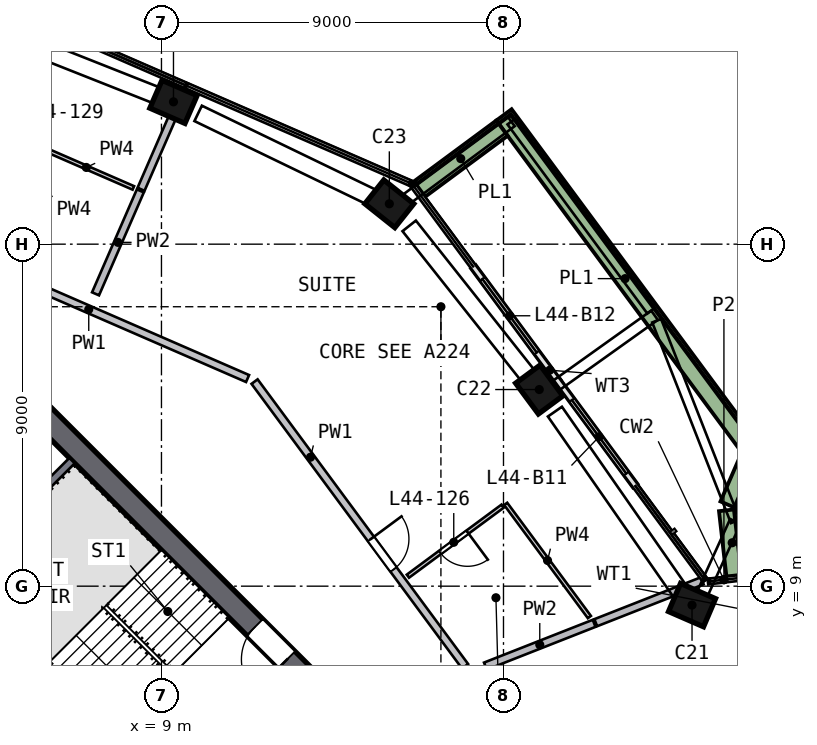
"""IFC4 building model, lengths in metres.
Left out: names, types, materials, properties, quantities, classifications, styles, units other than length and angle.
Written with IfcOpenShell. Run it as: python <this file> out.ifc"""

import sys

from ifc_helpers import new_model, si_unit, direction, frame, frame_2d, origin, origin_2d, place, context, subcontext, project, spatial, rectangle, extrude, element, fill, save


model = new_model("IFC4")
c1 = context("Model", 3, precision=1e-05, world=origin(), true_north=direction((0.0, 1.0)))
c2 = subcontext(c1, "Body", "Model", "MODEL_VIEW")
j1 = project(units=[si_unit("LENGTHUNIT", "METRE"), si_unit("PLANEANGLEUNIT", "RADIAN")], contexts=[c1])
p1 = place(None, origin())
s1 = spatial("IfcSite", under=j1, at=p1, CompositionType="ELEMENT")
p2 = place(p1, origin())
s2 = spatial("IfcBuilding", under=s1, at=p2, CompositionType="ELEMENT")
p3 = place(p2, frame((0.0, 0.0, 183.5)))
s3 = spatial("IfcBuildingStorey", under=s2, at=p3, CompositionType="ELEMENT", Elevation=183.5)
p4 = place(p3, frame((23.01, 8.37, 0.0), z_axis=(-0.040743451, 0.109079948, 0.993197632), x_axis=(0.916711582, -0.391338569, 0.080585355)))
e1 = element("IfcColumn", 1, at=p4, inside=s3, PredefinedType="COLUMN", context=c2, shape_type="SweptSolid", body=[
    extrude(rectangle(XDim=1.0, YDim=0.8, at=origin_2d()), origin(), (0.0, 0.0, 1.0), 3.212),
])
p5 = place(p3, frame((19.023, 14.066, 0.0), z_axis=(-0.067607436, 0.089889752, 0.9936544), x_axis=(-0.590507389, 0.799156424, -0.112472368)))
e2 = element("IfcColumn", 2, at=p5, inside=s3, PredefinedType="COLUMN", context=c2, shape_type="SweptSolid", body=[
    extrude(rectangle(XDim=1.0, YDim=0.8, at=origin_2d()), origin(), (0.0, 0.0, 1.0), 3.21),
])
p6 = place(p3, frame((15.106, 18.977, 0.0), z_axis=(-0.090848232, 0.07108209, 0.993324688), x_axis=(0.777092625, -0.618726057, 0.115347815)))
e3 = element("IfcColumn", 3, at=p6, inside=s3, PredefinedType="COLUMN", context=c2, shape_type="SweptSolid", body=[
    extrude(rectangle(XDim=1.0, YDim=0.8, at=origin_2d()), origin(), (0.0, 0.0, 1.0), 3.211),
])
p7 = place(p3, frame((9.441, 21.693, 0.0), z_axis=(-0.103577696, 0.044031928, 0.99364624), x_axis=(-0.911115934, 0.39648645, -0.112544433)))
e4 = element("IfcColumn", 4, at=p7, inside=s3, PredefinedType="COLUMN", context=c2, shape_type="SweptSolid", body=[
    extrude(rectangle(XDim=1.0, YDim=0.8, at=origin_2d()), origin(), (0.0, 0.0, 1.0), 3.21),
])
p8 = place(p3, frame((13.788, 5.587, 0.0), z_axis=(0.0, 0.0, 1.0), x_axis=(-0.707106781, 0.707106781, 0.0)))
e5 = element("IfcWall", 5, at=p8, inside=s3, PredefinedType="SHEAR", context=c2, shape_type="SweptSolid", body=[
    extrude(rectangle(XDim=11.598, YDim=0.6, at=frame_2d((5.799, 0.0))), origin(), (0.0, 0.0, 1.0), 3.5),
])
p9 = place(p8, frame((2.099, 0.0, 0.0)))
e6 = element("IfcOpeningElement", 6, at=p9, cuts=e5, PredefinedType="OPENING", context=c2, shape_type="SweptSolid", body=[
    extrude(rectangle(XDim=1.2, YDim=2.1, at=frame_2d((0.6, 1.05))), frame((0.0, 0.31, 0.0), z_axis=(0.0, -1.0, 0.0), x_axis=(1.0, 0.0, 0.0)), (0.0, 0.0, 1.0), 0.62),
])
p10 = place(p3, frame((21.466, 11.644, 0.0), z_axis=(0.0, 0.0, 1.0), x_axis=(-0.594528355, 0.804074645, 0.0)))
e7 = element("IfcWall", 7, at=p10, inside=s3, PredefinedType="SOLIDWALL", context=c2, shape_type="SweptSolid", body=[
    extrude(rectangle(XDim=3.4, YDim=0.15, at=frame_2d((1.7, 0.0))), origin(), (0.0, 0.0, 1.0), 2.475),
])
p11 = place(p10, frame((0.4, 0.0, 0.0)))
e8 = element("IfcOpeningElement", 8, at=p11, cuts=e7, PredefinedType="OPENING", context=c2, shape_type="SweptSolid", body=[
    extrude(rectangle(XDim=2.4, YDim=2.4, at=frame_2d((1.2, 1.2))), frame((0.0, 0.085, 0.0), z_axis=(0.0, -1.0, 0.0), x_axis=(1.0, 0.0, 0.0)), (0.0, 0.0, 1.0), 0.17),
])
p12 = place(p3, frame((19.445, 14.378, 0.0), z_axis=(0.0, 0.0, 1.0), x_axis=(-0.59454435, 0.804062818, 0.0)))
e9 = element("IfcWall", 9, at=p12, inside=s3, PredefinedType="SOLIDWALL", context=c2, shape_type="SweptSolid", body=[
    extrude(rectangle(XDim=3.761, YDim=0.15, at=frame_2d((1.881, 0.0))), origin(), (0.0, 0.0, 1.0), 2.475),
])
p13 = place(p12, frame((0.961, 0.0, 0.0)))
e10 = element("IfcOpeningElement", 10, at=p13, cuts=e9, PredefinedType="OPENING", context=c2, shape_type="SweptSolid", body=[
    extrude(rectangle(XDim=2.4, YDim=2.4, at=frame_2d((1.2, 1.2))), frame((0.0, 0.085, 0.0), z_axis=(0.0, -1.0, 0.0), x_axis=(1.0, 0.0, 0.0)), (0.0, 0.0, 1.0), 0.17),
])
p14 = place(p3, frame((24.115, 9.282, 0.0), z_axis=(0.0, 0.0, 1.0), x_axis=(-0.112969813, 0.993598421, 0.0)))
e11 = element("IfcWall", 11, at=p14, inside=s3, PredefinedType="SOLIDWALL", context=c2, shape_type="SweptSolid", body=[
    extrude(rectangle(XDim=1.731, YDim=0.5, at=frame_2d((0.865, 0.0))), origin(), (0.0, 0.0, 1.0), 0.7),
])
p15 = place(p3, frame((23.939, 11.13, 0.0), z_axis=(0.0, 0.0, 1.0), x_axis=(0.399110541, 0.916902817, 0.0)))
e12 = element("IfcWall", 12, at=p15, inside=s3, PredefinedType="SOLIDWALL", context=c2, shape_type="SweptSolid", body=[
    extrude(rectangle(XDim=1.695, YDim=0.5, at=frame_2d((0.848, 0.0))), origin(), (0.0, 0.0, 1.0), 0.7),
])
p16 = place(p3, frame((24.386, 12.784, 0.0), z_axis=(0.0, 0.0, 1.0), x_axis=(-0.594549224, 0.804059215, 0.0)))
e13 = element("IfcWall", 13, at=p16, inside=s3, PredefinedType="SOLIDWALL", context=c2, shape_type="SweptSolid", body=[
    extrude(rectangle(XDim=10.719, YDim=0.5, at=frame_2d((5.36, 0.0))), origin(), (0.0, 0.0, 1.0), 0.7),
])
p17 = place(p3, frame((17.96, 21.053, 0.0), z_axis=(0.0, 0.0, 1.0), x_axis=(-0.804052053, -0.594558909, 0.0)))
e14 = element("IfcWall", 14, at=p17, inside=s3, PredefinedType="SOLIDWALL", context=c2, shape_type="SweptSolid", body=[
    extrude(rectangle(XDim=2.699, YDim=0.5, at=frame_2d((1.35, 0.0))), origin(), (0.0, 0.0, 1.0), 0.7),
])
p18 = place(p3, frame((3.24, 9.629, 0.0), z_axis=(0.0, 0.0, 1.0), x_axis=(0.707106781, -0.707106781, 0.0)))
e15 = element("IfcWall", 15, at=p18, inside=s3, PredefinedType="SOLIDWALL", context=c2, shape_type="SweptSolid", body=[
    extrude(rectangle(XDim=9.036, YDim=0.2, at=frame_2d((4.518, 0.0))), origin(), (0.0, 0.0, 1.0), 3.19),
])
p19 = place(p18, frame((7.018, 0.0, 0.0)))
e16 = element("IfcOpeningElement", 16, at=p19, cuts=e15, PredefinedType="OPENING", context=c2, shape_type="SweptSolid", body=[
    extrude(rectangle(XDim=1.2, YDim=2.1, at=frame_2d((0.6, 1.05))), frame((0.0, 0.11, 0.0), z_axis=(0.0, -1.0, 0.0), x_axis=(1.0, 0.0, 0.0)), (0.0, 0.0, 1.0), 0.22),
])
p20 = place(p3, frame((3.677, 9.334, 0.0), z_axis=(0.0, 0.0, 1.0), x_axis=(0.707077716, 0.707135845, 0.0)))
e17 = element("IfcWall", 17, at=p20, inside=s3, PredefinedType="SOLIDWALL", context=c2, shape_type="SweptSolid", body=[
    extrude(rectangle(XDim=4.2, YDim=0.2, at=frame_2d((2.1, 0.0))), origin(), (0.0, 0.0, 1.0), 3.19),
])
p21 = place(p3, frame((11.266, 14.464, 0.0), z_axis=(0.0, 0.0, 1.0), x_axis=(-0.916919691, 0.399071774, 0.0)))
e18 = element("IfcWall", 18, at=p21, inside=s3, PredefinedType="SOLIDWALL", context=c2, shape_type="SweptSolid", body=[
    extrude(rectangle(XDim=9.116, YDim=0.2, at=frame_2d((4.558, 0.0))), origin(), (0.0, 0.0, 1.0), 3.19),
])
p22 = place(p3, frame((11.45, 14.384, 0.0), z_axis=(0.0, 0.0, 1.0), x_axis=(0.594543579, -0.804063388, 0.0)))
e19 = element("IfcWall", 19, at=p22, inside=s3, PredefinedType="SOLIDWALL", context=c2, shape_type="SweptSolid", body=[
    extrude(rectangle(XDim=9.316, YDim=0.2, at=frame_2d((4.658, 0.0))), origin(), (0.0, 0.0, 1.0), 3.19),
])
p23 = place(p22, frame((5.15, 0.0, 0.0)))
e20 = element("IfcOpeningElement", 20, at=p23, cuts=e19, PredefinedType="OPENING", context=c2, shape_type="SweptSolid", body=[
    extrude(rectangle(XDim=1.0, YDim=2.1, at=frame_2d((0.5, 1.05))), frame((0.0, 0.11, 0.0), z_axis=(0.0, -1.0, 0.0), x_axis=(1.0, 0.0, 0.0)), (0.0, 0.0, 1.0), 0.22),
])
p24 = place(p3, frame((7.265, 16.693, 0.0), z_axis=(0.0, 0.0, 1.0), x_axis=(0.399019171, 0.916942584, 0.0)))
e21 = element("IfcWall", 21, at=p24, inside=s3, PredefinedType="SOLIDWALL", context=c2, shape_type="SweptSolid", body=[
    extrude(rectangle(XDim=2.955, YDim=0.2, at=frame_2d((1.477, 0.0))), origin(), (0.0, 0.0, 1.0), 3.19),
])
p25 = place(p3, frame((8.463, 19.445, 0.0), z_axis=(0.0, 0.0, 1.0), x_axis=(0.399030644, 0.916937591, 0.0)))
e22 = element("IfcWall", 22, at=p25, inside=s3, PredefinedType="SOLIDWALL", context=c2, shape_type="SweptSolid", body=[
    extrude(rectangle(XDim=2.902, YDim=0.2, at=frame_2d((1.451, 0.0))), origin(), (0.0, 0.0, 1.0), 3.19),
])
p26 = place(p3, frame((17.524, 6.896, 0.0), z_axis=(0.0, 0.0, 1.0), x_axis=(0.93054289, 0.366182919, 0.0)))
e23 = element("IfcWall", 23, at=p26, inside=s3, PredefinedType="SOLIDWALL", context=c2, shape_type="SweptSolid", body=[
    extrude(rectangle(XDim=3.075, YDim=0.2, at=frame_2d((1.538, 0.0))), origin(), (0.0, 0.0, 1.0), 3.19),
])
p27 = place(p3, frame((20.428, 8.039, 0.0), z_axis=(0.0, 0.0, 1.0), x_axis=(0.930536516, 0.366199115, 0.0)))
e24 = element("IfcWall", 24, at=p27, inside=s3, PredefinedType="SOLIDWALL", context=c2, shape_type="SweptSolid", body=[
    extrude(rectangle(XDim=3.011, YDim=0.2, at=frame_2d((1.506, 0.0))), origin(), (0.0, 0.0, 1.0), 3.19),
])
p28 = place(p3, frame((8.26, 19.48, 0.0), z_axis=(0.0, 0.0, 1.0), x_axis=(-0.916894583, 0.399129457, 0.0)))
e25 = element("IfcWall", 25, at=p28, inside=s3, PredefinedType="PARTITIONING", context=c2, shape_type="SweptSolid", body=[
    extrude(rectangle(XDim=2.7, YDim=0.1, at=frame_2d((1.35, 0.0))), origin(), (0.0, 0.0, 1.0), 3.19),
])
p29 = place(p3, frame((17.978, 11.106, 0.0), z_axis=(0.0, 0.0, 1.0), x_axis=(-0.804082839, -0.594517273, 0.0)))
e26 = element("IfcWall", 26, at=p29, inside=s3, PredefinedType="PARTITIONING", context=c2, shape_type="SweptSolid", body=[
    extrude(rectangle(XDim=3.1, YDim=0.1, at=frame_2d((1.55, 0.0))), origin(), (0.0, 0.0, 1.0), 3.19),
])
p30 = place(p29, frame((1.15, 0.0, 0.0)))
e27 = element("IfcOpeningElement", 27, at=p30, cuts=e26, PredefinedType="OPENING", context=c2, shape_type="SweptSolid", body=[
    extrude(rectangle(XDim=0.9, YDim=2.1, at=frame_2d((0.45, 1.05))), frame((0.0, 0.06, 0.0), z_axis=(0.0, -1.0, 0.0), x_axis=(1.0, 0.0, 0.0)), (0.0, 0.0, 1.0), 0.12),
])
p31 = place(p3, frame((18.058, 11.166, 0.0), z_axis=(0.0, 0.0, 1.0), x_axis=(0.594533755, -0.804070652, 0.0)))
e28 = element("IfcWall", 28, at=p31, inside=s3, PredefinedType="PARTITIONING", context=c2, shape_type="SweptSolid", body=[
    extrude(rectangle(XDim=3.704, YDim=0.1, at=frame_2d((1.852, 0.0))), origin(), (0.0, 0.0, 1.0), 3.19),
])
p32 = place(p11, origin())
e29 = element("IfcDoor", 29, at=p32, inside=s3, OperationType="SLIDING_TO_RIGHT", PredefinedType="DOOR", context=c2, shape_type="SweptSolid", body=[
    extrude(rectangle(XDim=2.4, YDim=2.4, at=frame_2d((1.2, 1.2))), frame((0.0, 0.025, 0.0), z_axis=(0.0, -1.0, 0.0), x_axis=(1.0, 0.0, 0.0)), (0.0, 0.0, 1.0), 0.05),
])
fill(e8, e29)
p33 = place(p13, origin())
e30 = element("IfcDoor", 30, at=p33, inside=s3, OperationType="SLIDING_TO_LEFT", PredefinedType="DOOR", context=c2, shape_type="SweptSolid", body=[
    extrude(rectangle(XDim=2.4, YDim=2.4, at=frame_2d((1.2, 1.2))), frame((0.0, 0.025, 0.0), z_axis=(0.0, -1.0, 0.0), x_axis=(1.0, 0.0, 0.0)), (0.0, 0.0, 1.0), 0.05),
])
fill(e10, e30)
p34 = place(p9, origin())
e31 = element("IfcDoor", 31, at=p34, inside=s3, OperationType="SINGLE_SWING_LEFT", PredefinedType="DOOR", context=c2, shape_type="SweptSolid", body=[
    extrude(rectangle(XDim=1.2, YDim=2.1, at=frame_2d((0.6, 1.05))), frame((0.0, 0.025, 0.0), z_axis=(0.0, -1.0, 0.0), x_axis=(1.0, 0.0, 0.0)), (0.0, 0.0, 1.0), 0.05),
])
fill(e6, e31)
p35 = place(p23, origin())
e32 = element("IfcDoor", 32, at=p35, inside=s3, OperationType="SINGLE_SWING_LEFT", PredefinedType="DOOR", context=c2, shape_type="SweptSolid", body=[
    extrude(rectangle(XDim=1.0, YDim=2.1, at=frame_2d((0.5, 1.05))), frame((0.0, 0.025, 0.0), z_axis=(0.0, -1.0, 0.0), x_axis=(1.0, 0.0, 0.0)), (0.0, 0.0, 1.0), 0.05),
])
fill(e20, e32)
p36 = place(p30, origin())
e33 = element("IfcDoor", 33, at=p36, inside=s3, OperationType="SINGLE_SWING_LEFT", PredefinedType="DOOR", context=c2, shape_type="SweptSolid", body=[
    extrude(rectangle(XDim=0.9, YDim=2.1, at=frame_2d((0.45, 1.05))), frame((0.0, 0.025, 0.0), z_axis=(0.0, -1.0, 0.0), x_axis=(1.0, 0.0, 0.0)), (0.0, 0.0, 1.0), 0.05),
])
fill(e27, e33)
save(model, sys.argv[1])
